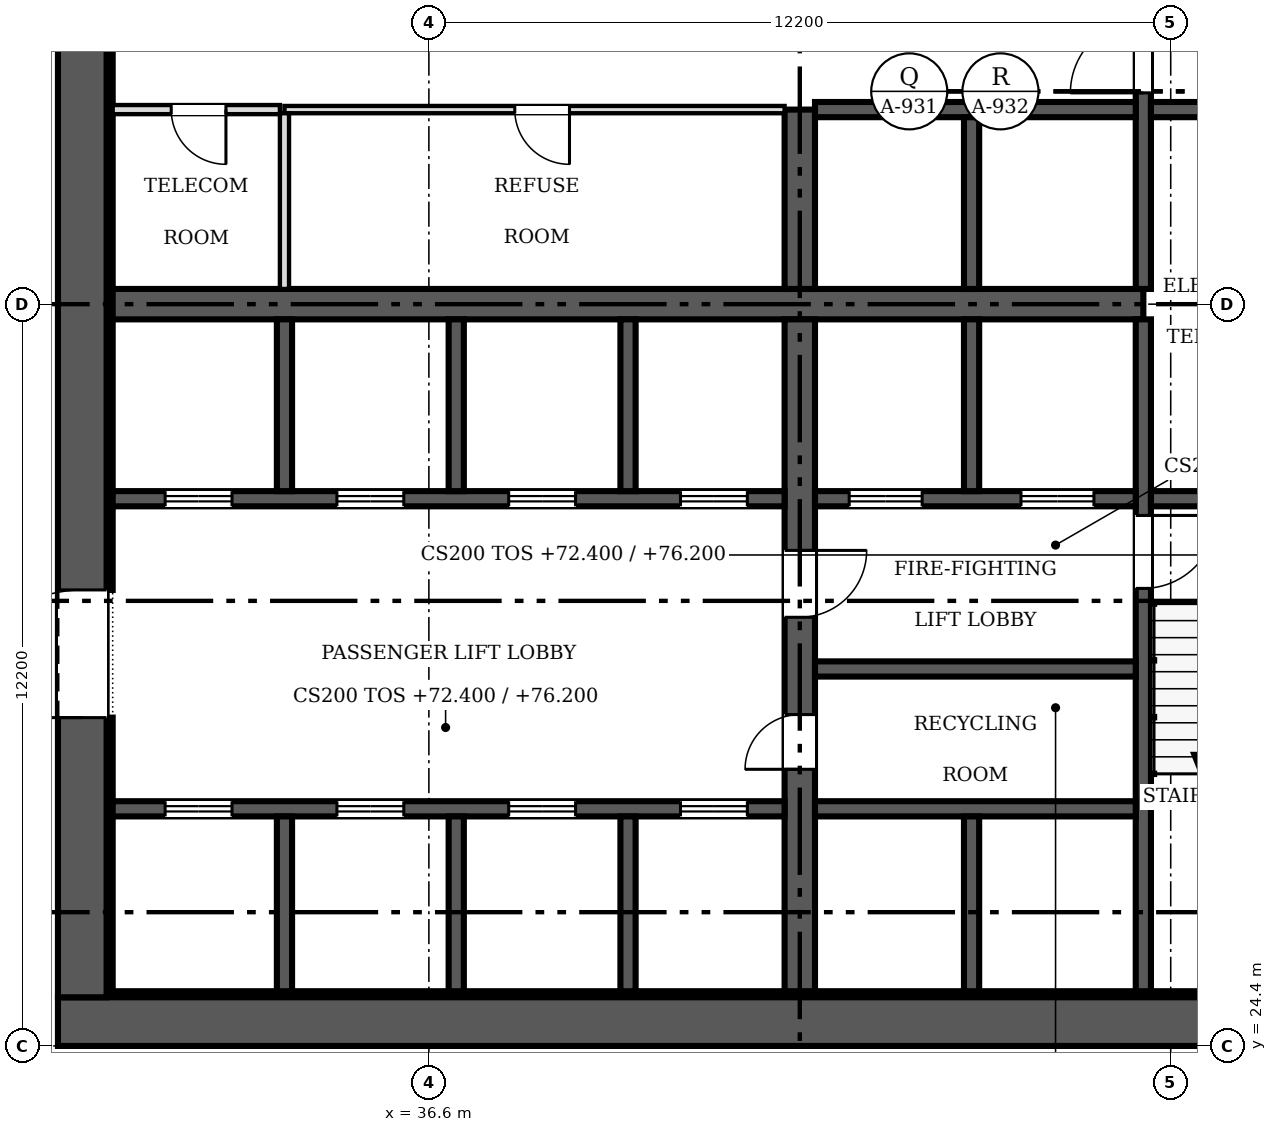
"""IFC4 building model, lengths in metres.
Left out: names, types, materials, properties, quantities, classifications, styles, units other than length and angle.
Written with IfcOpenShell. Run it as: python <this file> out.ifc"""

import sys

from ifc_helpers import new_model, si_unit, direction, frame, frame_2d, origin, place, context, subcontext, project, spatial, rectangle, extrude, source, transform, mapped, element, fill, save


model = new_model("IFC4")
c1 = context("Model", 3, precision=1e-05, world=origin(), true_north=direction((0.0, 1.0)))
c2 = subcontext(c1, "Body", "Model", "MODEL_VIEW")
j1 = project(units=[si_unit("LENGTHUNIT", "METRE"), si_unit("PLANEANGLEUNIT", "RADIAN")], contexts=[c1])
p1 = place(None, origin())
s1 = spatial("IfcSite", under=j1, at=p1, CompositionType="ELEMENT")
p2 = place(p1, origin())
s2 = spatial("IfcBuilding", under=s1, at=p2, CompositionType="ELEMENT")
p3 = place(p2, frame((0.0, 0.0, 72.4)))
s3 = spatial("IfcBuildingStorey", under=s2, at=p3, CompositionType="ELEMENT", Elevation=72.4)
p4 = place(p3, frame((54.9, 24.8, 0.0), z_axis=(0.0, 0.0, 1.0), x_axis=(-1.0, 0.0, 0.0)))
e1 = element("IfcWall", 1, at=p4, inside=s3, PredefinedType="SHEAR", context=c2, shape_type="SweptSolid", body=[
    extrude(rectangle(XDim=24.4, YDim=0.8, at=frame_2d((12.2, 0.0))), origin(), (0.0, 0.0, 1.0), 3.8),
])
m1 = source(origin(), c2, "Body", "SweptSolid", [
    extrude(rectangle(XDim=1.2, YDim=2.1, at=frame_2d((0.6, 1.05))), frame((0.0, 0.41, 0.0), z_axis=(0.0, -1.0, 0.0), x_axis=(1.0, 0.0, 0.0)), (0.0, 0.0, 1.0), 0.82),
])
p5 = place(p4, frame((1.5, 0.0, 0.0)))
e2 = element("IfcOpeningElement", 2, at=p5, cuts=e1, PredefinedType="OPENING", context=c2, shape_type="MappedRepresentation", body=[
    mapped(m1, transform((0.0, 0.0, 0.0), scale=1.0)),
])
p6 = place(p3, frame((30.9, 25.2, 0.0), z_axis=(0.0, 0.0, 1.0), x_axis=(0.0, 1.0, 0.0)))
e3 = element("IfcWall", 3, at=p6, inside=s3, PredefinedType="SHEAR", context=c2, shape_type="SweptSolid", body=[
    extrude(rectangle(XDim=22.8, YDim=0.8, at=frame_2d((11.4, 0.0))), origin(), (0.0, 0.0, 1.0), 3.8),
])
m2 = source(origin(), c2, "Body", "SweptSolid", [
    extrude(rectangle(XDim=2.1, YDim=2.4, at=frame_2d((1.05, 1.2))), frame((0.0, 0.41, 0.0), z_axis=(0.0, -1.0, 0.0), x_axis=(1.0, 0.0, 0.0)), (0.0, 0.0, 1.0), 0.82),
])
p7 = place(p6, frame((4.6, 0.0, 0.0)))
e4 = element("IfcOpeningElement", 4, at=p7, cuts=e3, PredefinedType="OPENING", context=c2, shape_type="MappedRepresentation", body=[
    mapped(m2, transform((0.0, 0.0, 0.0), scale=1.0)),
])
p8 = place(p6, frame((16.1, 0.0, 0.0)))
e5 = element("IfcOpeningElement", 5, at=p8, cuts=e3, PredefinedType="OPENING", context=c2, shape_type="MappedRepresentation", body=[
    mapped(m2, transform((0.0, 0.0, 0.0), scale=1.0)),
])
p9 = place(p3, frame((31.3, 25.25, 0.0), z_axis=(0.0, 0.0, 1.0), x_axis=(1.0, 0.0, 0.0)))
e6 = element("IfcWall", 6, at=p9, inside=s3, PredefinedType="SOLIDWALL", context=c2, shape_type="SweptSolid", body=[
    extrude(rectangle(XDim=20.9, YDim=0.1, at=frame_2d((10.45, 0.0))), origin(), (0.0, 0.0, 1.0), 3.8),
])
p10 = place(p3, frame((31.35, 25.3, 0.0), z_axis=(0.0, 0.0, 1.0), x_axis=(0.0, 1.0, 0.0)))
e7 = element("IfcWall", 7, at=p10, inside=s3, PredefinedType="SOLIDWALL", context=c2, shape_type="SweptSolid", body=[
    extrude(rectangle(XDim=4.5, YDim=0.1, at=frame_2d((2.25, 0.0))), origin(), (0.0, 0.0, 1.0), 3.8),
])
p11 = place(p3, frame((31.35, 31.9, 0.0), z_axis=(0.0, 0.0, 1.0), x_axis=(0.0, 1.0, 0.0)))
e8 = element("IfcWall", 8, at=p11, inside=s3, PredefinedType="SOLIDWALL", context=c2, shape_type="SweptSolid", body=[
    extrude(rectangle(XDim=9.4, YDim=0.1, at=frame_2d((4.7, 0.0))), origin(), (0.0, 0.0, 1.0), 3.8),
])
p12 = place(p3, frame((31.4, 36.6, 0.0), z_axis=(0.0, 0.0, 1.0), x_axis=(1.0, 0.0, 0.0)))
e9 = element("IfcWall", 9, at=p12, inside=s3, PredefinedType="SHEAR", context=c2, shape_type="SweptSolid", body=[
    extrude(rectangle(XDim=16.95, YDim=0.5, at=frame_2d((8.475, 0.0))), origin(), (0.0, 0.0, 1.0), 3.8),
])
p13 = place(p3, frame((42.7, 36.35, 0.0), z_axis=(0.0, 0.0, 1.0), x_axis=(0.0, -1.0, 0.0)))
e10 = element("IfcWall", 10, at=p13, inside=s3, PredefinedType="SHEAR", context=c2, shape_type="SweptSolid", body=[
    extrude(rectangle(XDim=11.05, YDim=0.5, at=frame_2d((5.525, 0.0))), origin(), (0.0, 0.0, 1.0), 3.8),
])
m3 = source(origin(), c2, "Body", "SweptSolid", [
    extrude(rectangle(XDim=0.9, YDim=2.1, at=frame_2d((0.45, 1.05))), frame((0.0, 0.26, 0.0), z_axis=(0.0, -1.0, 0.0), x_axis=(1.0, 0.0, 0.0)), (0.0, 0.0, 1.0), 0.52),
])
p14 = place(p13, frame((6.5, 0.0, 0.0)))
e11 = element("IfcOpeningElement", 11, at=p14, cuts=e10, PredefinedType="OPENING", context=c2, shape_type="MappedRepresentation", body=[
    mapped(m3, transform((0.0, 0.0, 0.0), scale=1.0)),
])
m4 = source(origin(), c2, "Body", "SweptSolid", [
    extrude(rectangle(XDim=1.1, YDim=2.1, at=frame_2d((0.55, 1.05))), frame((0.0, 0.26, 0.0), z_axis=(0.0, -1.0, 0.0), x_axis=(1.0, 0.0, 0.0)), (0.0, 0.0, 1.0), 0.52),
])
p15 = place(p13, frame((3.8, 0.0, 0.0)))
e12 = element("IfcOpeningElement", 12, at=p15, cuts=e10, PredefinedType="OPENING", context=c2, shape_type="MappedRepresentation", body=[
    mapped(m4, transform((0.0, 0.0, 0.0), scale=1.0)),
])
p16 = place(p3, frame((42.7, 36.85, 0.0), z_axis=(0.0, 0.0, 1.0), x_axis=(0.0, 1.0, 0.0)))
e13 = element("IfcWall", 13, at=p16, inside=s3, PredefinedType="SHEAR", context=c2, shape_type="SweptSolid", body=[
    extrude(rectangle(XDim=2.95, YDim=0.5, at=frame_2d((1.475, 0.0))), origin(), (0.0, 0.0, 1.0), 3.8),
])
p17 = place(p3, frame((48.35, 36.35, 0.0), z_axis=(0.0, 0.0, 1.0), x_axis=(0.0, -1.0, 0.0)))
e14 = element("IfcWall", 14, at=p17, inside=s3, PredefinedType="SOLIDWALL", context=c2, shape_type="SweptSolid", body=[
    extrude(rectangle(XDim=11.05, YDim=0.25, at=frame_2d((5.525, 0.0))), origin(), (0.0, 0.0, 1.0), 3.8),
])
m5 = source(origin(), c2, "Body", "SweptSolid", [
    extrude(rectangle(XDim=1.2, YDim=2.1, at=frame_2d((0.6, 1.05))), frame((0.0, 0.135, 0.0), z_axis=(0.0, -1.0, 0.0), x_axis=(1.0, 0.0, 0.0)), (0.0, 0.0, 1.0), 0.27),
])
p18 = place(p17, frame((3.225, 0.0, 0.0)))
e15 = element("IfcOpeningElement", 15, at=p18, cuts=e14, PredefinedType="OPENING", context=c2, shape_type="MappedRepresentation", body=[
    mapped(m5, transform((0.0, 0.0, 0.0), scale=1.0)),
])
p19 = place(p3, frame((48.35, 47.9, 0.0), z_axis=(0.0, 0.0, 1.0), x_axis=(0.0, -1.0, 0.0)))
e16 = element("IfcWall", 16, at=p19, inside=s3, PredefinedType="SOLIDWALL", context=c2, shape_type="SweptSolid", body=[
    extrude(rectangle(XDim=11.05, YDim=0.25, at=frame_2d((5.525, 0.0))), origin(), (0.0, 0.0, 1.0), 3.8),
])
p20 = place(p19, frame((6.625, 0.0, 0.0)))
e17 = element("IfcOpeningElement", 17, at=p20, cuts=e16, PredefinedType="OPENING", context=c2, shape_type="MappedRepresentation", body=[
    mapped(m5, transform((0.0, 0.0, 0.0), scale=1.0)),
])
p21 = place(p3, frame((42.45, 33.4, 0.0), z_axis=(0.0, 0.0, 1.0), x_axis=(-1.0, 0.0, 0.0)))
e18 = element("IfcWall", 18, at=p21, inside=s3, PredefinedType="SOLIDWALL", context=c2, shape_type="SweptSolid", body=[
    extrude(rectangle(XDim=11.05, YDim=0.25, at=frame_2d((5.525, 0.0))), origin(), (0.0, 0.0, 1.0), 3.8),
])
m6 = source(origin(), c2, "Body", "SweptSolid", [
    extrude(rectangle(XDim=1.1, YDim=2.1, at=frame_2d((0.55, 1.05))), frame((0.0, 0.135, 0.0), z_axis=(0.0, -1.0, 0.0), x_axis=(1.0, 0.0, 0.0)), (0.0, 0.0, 1.0), 0.27),
])
p22 = place(p21, frame((9.087, 0.0, 0.0)))
e19 = element("IfcOpeningElement", 19, at=p22, cuts=e18, PredefinedType="OPENING", context=c2, shape_type="MappedRepresentation", body=[
    mapped(m6, transform((0.0, 0.0, 0.0), scale=1.0)),
])
p23 = place(p21, frame((6.262, 0.0, 0.0)))
e20 = element("IfcOpeningElement", 20, at=p23, cuts=e18, PredefinedType="OPENING", context=c2, shape_type="MappedRepresentation", body=[
    mapped(m6, transform((0.0, 0.0, 0.0), scale=1.0)),
])
p24 = place(p21, frame((3.438, 0.0, 0.0)))
e21 = element("IfcOpeningElement", 21, at=p24, cuts=e18, PredefinedType="OPENING", context=c2, shape_type="MappedRepresentation", body=[
    mapped(m6, transform((0.0, 0.0, 0.0), scale=1.0)),
])
p25 = place(p21, frame((0.613, 0.0, 0.0)))
e22 = element("IfcOpeningElement", 22, at=p25, cuts=e18, PredefinedType="OPENING", context=c2, shape_type="MappedRepresentation", body=[
    mapped(m6, transform((0.0, 0.0, 0.0), scale=1.0)),
])
p26 = place(p3, frame((48.225, 33.4, 0.0), z_axis=(0.0, 0.0, 1.0), x_axis=(-1.0, 0.0, 0.0)))
e23 = element("IfcWall", 23, at=p26, inside=s3, PredefinedType="SOLIDWALL", context=c2, shape_type="SweptSolid", body=[
    extrude(rectangle(XDim=5.275, YDim=0.25, at=frame_2d((2.638, 0.0))), origin(), (0.0, 0.0, 1.0), 3.8),
])
p27 = place(p26, frame((3.512, 0.0, 0.0)))
e24 = element("IfcOpeningElement", 24, at=p27, cuts=e23, PredefinedType="OPENING", context=c2, shape_type="MappedRepresentation", body=[
    mapped(m5, transform((0.0, 0.0, 0.0), scale=1.0)),
])
p28 = place(p26, frame((0.688, 0.0, 0.0)))
e25 = element("IfcOpeningElement", 25, at=p28, cuts=e23, PredefinedType="OPENING", context=c2, shape_type="MappedRepresentation", body=[
    mapped(m5, transform((0.0, 0.0, 0.0), scale=1.0)),
])
p29 = place(p3, frame((48.475, 33.4, 0.0), z_axis=(0.0, 0.0, 1.0), x_axis=(1.0, 0.0, 0.0)))
e26 = element("IfcWall", 26, at=p29, inside=s3, PredefinedType="SOLIDWALL", context=c2, shape_type="SweptSolid", body=[
    extrude(rectangle(XDim=3.525, YDim=0.25, at=frame_2d((1.762, 0.0))), origin(), (0.0, 0.0, 1.0), 3.8),
])
p30 = place(p3, frame((31.4, 28.3, 0.0), z_axis=(0.0, 0.0, 1.0), x_axis=(1.0, 0.0, 0.0)))
e27 = element("IfcWall", 27, at=p30, inside=s3, PredefinedType="SOLIDWALL", context=c2, shape_type="SweptSolid", body=[
    extrude(rectangle(XDim=11.05, YDim=0.25, at=frame_2d((5.525, 0.0))), origin(), (0.0, 0.0, 1.0), 3.8),
])
p31 = place(p30, frame((0.863, 0.0, 0.0)))
e28 = element("IfcOpeningElement", 28, at=p31, cuts=e27, PredefinedType="OPENING", context=c2, shape_type="MappedRepresentation", body=[
    mapped(m6, transform((0.0, 0.0, 0.0), scale=1.0)),
])
p32 = place(p30, frame((3.688, 0.0, 0.0)))
e29 = element("IfcOpeningElement", 29, at=p32, cuts=e27, PredefinedType="OPENING", context=c2, shape_type="MappedRepresentation", body=[
    mapped(m6, transform((0.0, 0.0, 0.0), scale=1.0)),
])
p33 = place(p30, frame((6.512, 0.0, 0.0)))
e30 = element("IfcOpeningElement", 30, at=p33, cuts=e27, PredefinedType="OPENING", context=c2, shape_type="MappedRepresentation", body=[
    mapped(m6, transform((0.0, 0.0, 0.0), scale=1.0)),
])
p34 = place(p30, frame((9.337, 0.0, 0.0)))
e31 = element("IfcOpeningElement", 31, at=p34, cuts=e27, PredefinedType="OPENING", context=c2, shape_type="MappedRepresentation", body=[
    mapped(m6, transform((0.0, 0.0, 0.0), scale=1.0)),
])
for number, where, z_axis, x_axis in (
    (32, (42.95, 28.3, 0.0), (0.0, 0.0, 1.0), (1.0, 0.0, 0.0)),
    (33, (42.95, 39.8, 0.0), (0.0, 0.0, 1.0), (1.0, 0.0, 0.0)),
):
    element("IfcWall", number, at=place(p3, frame(where, z_axis=z_axis, x_axis=x_axis)), inside=s3, PredefinedType="SOLIDWALL", context=c2, shape_type="SweptSolid", body=[
        extrude(rectangle(XDim=5.275, YDim=0.25, at=frame_2d((2.638, 0.0))), origin(), (0.0, 0.0, 1.0), 3.8),
    ])
p35 = place(p3, frame((48.475, 39.8, 0.0), z_axis=(0.0, 0.0, 1.0), x_axis=(1.0, 0.0, 0.0)))
e34 = element("IfcWall", 34, at=p35, inside=s3, PredefinedType="SOLIDWALL", context=c2, shape_type="SweptSolid", body=[
    extrude(rectangle(XDim=3.525, YDim=0.25, at=frame_2d((1.762, 0.0))), origin(), (0.0, 0.0, 1.0), 3.8),
])
p36 = place(p3, frame((45.525, 33.525, 0.0), z_axis=(0.0, 0.0, 1.0), x_axis=(0.0, 1.0, 0.0)))
e35 = element("IfcWall", 35, at=p36, inside=s3, PredefinedType="SOLIDWALL", context=c2, shape_type="SweptSolid", body=[
    extrude(rectangle(XDim=2.825, YDim=0.25, at=frame_2d((1.413, 0.0))), origin(), (0.0, 0.0, 1.0), 3.8),
])
p37 = place(p3, frame((45.525, 36.85, 0.0), z_axis=(0.0, 0.0, 1.0), x_axis=(0.0, 1.0, 0.0)))
e36 = element("IfcWall", 36, at=p37, inside=s3, PredefinedType="SOLIDWALL", context=c2, shape_type="SweptSolid", body=[
    extrude(rectangle(XDim=2.825, YDim=0.25, at=frame_2d((1.413, 0.0))), origin(), (0.0, 0.0, 1.0), 3.8),
])
p38 = place(p3, frame((42.95, 30.6, 0.0), z_axis=(0.0, 0.0, 1.0), x_axis=(1.0, 0.0, 0.0)))
e37 = element("IfcWall", 37, at=p38, inside=s3, PredefinedType="SOLIDWALL", context=c2, shape_type="SweptSolid", body=[
    extrude(rectangle(XDim=5.275, YDim=0.25, at=frame_2d((2.638, 0.0))), origin(), (0.0, 0.0, 1.0), 3.8),
])
for number, where, z_axis, x_axis in (
    (38, (34.225, 33.525, 0.0), (0.0, 0.0, 1.0), (0.0, 1.0, 0.0)),
    (39, (37.05, 33.525, 0.0), (0.0, 0.0, 1.0), (0.0, 1.0, 0.0)),
    (40, (39.875, 33.525, 0.0), (0.0, 0.0, 1.0), (0.0, 1.0, 0.0)),
):
    element("IfcWall", number, at=place(p3, frame(where, z_axis=z_axis, x_axis=x_axis)), inside=s3, PredefinedType="SOLIDWALL", context=c2, shape_type="SweptSolid", body=[
        extrude(rectangle(XDim=2.825, YDim=0.25, at=frame_2d((1.413, 0.0))), origin(), (0.0, 0.0, 1.0), 3.8),
    ])
for number, where, z_axis, x_axis in (
    (41, (34.225, 25.3, 0.0), (0.0, 0.0, 1.0), (0.0, 1.0, 0.0)),
    (42, (37.05, 25.3, 0.0), (0.0, 0.0, 1.0), (0.0, 1.0, 0.0)),
    (43, (39.875, 25.3, 0.0), (0.0, 0.0, 1.0), (0.0, 1.0, 0.0)),
    (44, (45.525, 25.3, 0.0), (0.0, 0.0, 1.0), (0.0, 1.0, 0.0)),
):
    element("IfcWall", number, at=place(p3, frame(where, z_axis=z_axis, x_axis=x_axis)), inside=s3, PredefinedType="SOLIDWALL", context=c2, shape_type="SweptSolid", body=[
        extrude(rectangle(XDim=2.875, YDim=0.25, at=frame_2d((1.438, 0.0))), origin(), (0.0, 0.0, 1.0), 3.8),
    ])
p39 = place(p3, frame((42.45, 39.8, 0.0), z_axis=(0.0, 0.0, 1.0), x_axis=(-1.0, 0.0, 0.0)))
e45 = element("IfcWall", 45, at=p39, inside=s3, PredefinedType="PARTITIONING", context=c2, shape_type="SweptSolid", body=[
    extrude(rectangle(XDim=8.225, YDim=0.12, at=frame_2d((4.112, 0.0))), origin(), (0.0, 0.0, 1.0), 3.6),
])
m7 = source(origin(), c2, "Body", "SweptSolid", [
    extrude(rectangle(XDim=0.9, YDim=2.1, at=frame_2d((0.45, 1.05))), frame((0.0, 0.07, 0.0), z_axis=(0.0, -1.0, 0.0), x_axis=(1.0, 0.0, 0.0)), (0.0, 0.0, 1.0), 0.14),
])
p40 = place(p39, frame((3.538, 0.0, 0.0)))
e46 = element("IfcOpeningElement", 46, at=p40, cuts=e45, PredefinedType="OPENING", context=c2, shape_type="MappedRepresentation", body=[
    mapped(m7, transform((0.0, 0.0, 0.0), scale=1.0)),
])
p41 = place(p3, frame((34.225, 36.85, 0.0), z_axis=(0.0, 0.0, 1.0), x_axis=(0.0, 1.0, 0.0)))
e47 = element("IfcWall", 47, at=p41, inside=s3, PredefinedType="PARTITIONING", context=c2, shape_type="SweptSolid", body=[
    extrude(rectangle(XDim=2.89, YDim=0.15, at=frame_2d((1.445, 0.0))), origin(), (0.0, 0.0, 1.0), 3.6),
])
p42 = place(p3, frame((34.15, 39.8, 0.0), z_axis=(0.0, 0.0, 1.0), x_axis=(-1.0, 0.0, 0.0)))
e48 = element("IfcWall", 48, at=p42, inside=s3, PredefinedType="PARTITIONING", context=c2, shape_type="SweptSolid", body=[
    extrude(rectangle(XDim=2.75, YDim=0.15, at=frame_2d((1.375, 0.0))), origin(), (0.0, 0.0, 1.0), 3.6),
])
m8 = source(origin(), c2, "Body", "SweptSolid", [
    extrude(rectangle(XDim=0.9, YDim=2.1, at=frame_2d((0.45, 1.05))), frame((0.0, 0.085, 0.0), z_axis=(0.0, -1.0, 0.0), x_axis=(1.0, 0.0, 0.0)), (0.0, 0.0, 1.0), 0.17),
])
p43 = place(p42, frame((0.887, 0.0, 0.0)))
e49 = element("IfcOpeningElement", 49, at=p43, cuts=e48, PredefinedType="OPENING", context=c2, shape_type="MappedRepresentation", body=[
    mapped(m8, transform((0.0, 0.0, 0.0), scale=1.0)),
])
m9 = source(origin(), c2, "Body", "SweptSolid", [
    extrude(rectangle(XDim=2.1, YDim=2.4, at=frame_2d((1.05, 1.2))), frame((0.0, 0.025, 0.0), z_axis=(0.0, -1.0, 0.0), x_axis=(1.0, 0.0, 0.0)), (0.0, 0.0, 1.0), 0.05),
])
p44 = place(p7, origin())
e50 = element("IfcDoor", 50, at=p44, inside=s3, OperationType="DOUBLE_DOOR_SINGLE_SWING", PredefinedType="DOOR", context=c2, shape_type="MappedRepresentation", body=[
    mapped(m9, transform((0.0, 0.0, 0.0), scale=1.0)),
])
fill(e4, e50)
m10 = source(origin(), c2, "Body", "SweptSolid", [
    extrude(rectangle(XDim=0.9, YDim=2.1, at=frame_2d((0.45, 1.05))), frame((0.0, 0.025, 0.0), z_axis=(0.0, -1.0, 0.0), x_axis=(1.0, 0.0, 0.0)), (0.0, 0.0, 1.0), 0.05),
])
p45 = place(p14, origin())
e51 = element("IfcDoor", 51, at=p45, inside=s3, OperationType="SINGLE_SWING_RIGHT", PredefinedType="DOOR", context=c2, shape_type="MappedRepresentation", body=[
    mapped(m10, transform((0.0, 0.0, 0.0), scale=1.0)),
])
fill(e11, e51)
m11 = source(origin(), c2, "Body", "SweptSolid", [
    extrude(rectangle(XDim=1.1, YDim=2.1, at=frame_2d((0.55, 1.05))), frame((0.0, 0.025, 0.0), z_axis=(0.0, -1.0, 0.0), x_axis=(1.0, 0.0, 0.0)), (0.0, 0.0, 1.0), 0.05),
])
p46 = place(p15, origin())
e52 = element("IfcDoor", 52, at=p46, inside=s3, OperationType="SINGLE_SWING_LEFT", PredefinedType="DOOR", context=c2, shape_type="MappedRepresentation", body=[
    mapped(m11, transform((0.0, 0.0, 0.0), scale=1.0)),
])
fill(e12, e52)
m12 = source(origin(), c2, "Body", "SweptSolid", [
    extrude(rectangle(XDim=1.2, YDim=2.1, at=frame_2d((0.6, 1.05))), frame((0.0, 0.025, 0.0), z_axis=(0.0, -1.0, 0.0), x_axis=(1.0, 0.0, 0.0)), (0.0, 0.0, 1.0), 0.05),
])
p47 = place(p18, origin())
e53 = element("IfcDoor", 53, at=p47, inside=s3, OperationType="SINGLE_SWING_LEFT", PredefinedType="DOOR", context=c2, shape_type="MappedRepresentation", body=[
    mapped(m12, transform((0.0, 0.0, 0.0), scale=1.0)),
])
fill(e15, e53)
p48 = place(p20, origin())
e54 = element("IfcDoor", 54, at=p48, inside=s3, OperationType="SINGLE_SWING_RIGHT", PredefinedType="DOOR", context=c2, shape_type="MappedRepresentation", body=[
    mapped(m12, transform((0.0, 0.0, 0.0), scale=1.0)),
])
fill(e17, e54)
p49 = place(p22, origin())
e55 = element("IfcDoor", 55, at=p49, inside=s3, OperationType="DOUBLE_DOOR_SLIDING", PredefinedType="DOOR", context=c2, shape_type="MappedRepresentation", body=[
    mapped(m11, transform((0.0, 0.0, 0.0), scale=1.0)),
])
fill(e19, e55)
p50 = place(p23, origin())
e56 = element("IfcDoor", 56, at=p50, inside=s3, OperationType="DOUBLE_DOOR_SLIDING", PredefinedType="DOOR", context=c2, shape_type="MappedRepresentation", body=[
    mapped(m11, transform((0.0, 0.0, 0.0), scale=1.0)),
])
fill(e20, e56)
p51 = place(p24, origin())
e57 = element("IfcDoor", 57, at=p51, inside=s3, OperationType="DOUBLE_DOOR_SLIDING", PredefinedType="DOOR", context=c2, shape_type="MappedRepresentation", body=[
    mapped(m11, transform((0.0, 0.0, 0.0), scale=1.0)),
])
fill(e21, e57)
p52 = place(p25, origin())
e58 = element("IfcDoor", 58, at=p52, inside=s3, OperationType="DOUBLE_DOOR_SLIDING", PredefinedType="DOOR", context=c2, shape_type="MappedRepresentation", body=[
    mapped(m11, transform((0.0, 0.0, 0.0), scale=1.0)),
])
fill(e22, e58)
p53 = place(p27, origin())
e59 = element("IfcDoor", 59, at=p53, inside=s3, OperationType="DOUBLE_DOOR_SLIDING", PredefinedType="DOOR", context=c2, shape_type="MappedRepresentation", body=[
    mapped(m12, transform((0.0, 0.0, 0.0), scale=1.0)),
])
fill(e24, e59)
p54 = place(p28, origin())
e60 = element("IfcDoor", 60, at=p54, inside=s3, OperationType="DOUBLE_DOOR_SLIDING", PredefinedType="DOOR", context=c2, shape_type="MappedRepresentation", body=[
    mapped(m12, transform((0.0, 0.0, 0.0), scale=1.0)),
])
fill(e25, e60)
p55 = place(p31, origin())
e61 = element("IfcDoor", 61, at=p55, inside=s3, OperationType="DOUBLE_DOOR_SLIDING", PredefinedType="DOOR", context=c2, shape_type="MappedRepresentation", body=[
    mapped(m11, transform((0.0, 0.0, 0.0), scale=1.0)),
])
fill(e28, e61)
p56 = place(p32, origin())
e62 = element("IfcDoor", 62, at=p56, inside=s3, OperationType="DOUBLE_DOOR_SLIDING", PredefinedType="DOOR", context=c2, shape_type="MappedRepresentation", body=[
    mapped(m11, transform((0.0, 0.0, 0.0), scale=1.0)),
])
fill(e29, e62)
p57 = place(p33, origin())
e63 = element("IfcDoor", 63, at=p57, inside=s3, OperationType="DOUBLE_DOOR_SLIDING", PredefinedType="DOOR", context=c2, shape_type="MappedRepresentation", body=[
    mapped(m11, transform((0.0, 0.0, 0.0), scale=1.0)),
])
fill(e30, e63)
p58 = place(p34, origin())
e64 = element("IfcDoor", 64, at=p58, inside=s3, OperationType="DOUBLE_DOOR_SLIDING", PredefinedType="DOOR", context=c2, shape_type="MappedRepresentation", body=[
    mapped(m11, transform((0.0, 0.0, 0.0), scale=1.0)),
])
fill(e31, e64)
p59 = place(p40, origin())
e65 = element("IfcDoor", 65, at=p59, inside=s3, OperationType="SINGLE_SWING_LEFT", PredefinedType="DOOR", context=c2, shape_type="MappedRepresentation", body=[
    mapped(m10, transform((0.0, 0.0, 0.0), scale=1.0)),
])
fill(e46, e65)
p60 = place(p43, origin())
e66 = element("IfcDoor", 66, at=p60, inside=s3, OperationType="SINGLE_SWING_LEFT", PredefinedType="DOOR", context=c2, shape_type="MappedRepresentation", body=[
    mapped(m10, transform((0.0, 0.0, 0.0), scale=1.0)),
])
fill(e49, e66)
save(model, sys.argv[1])
